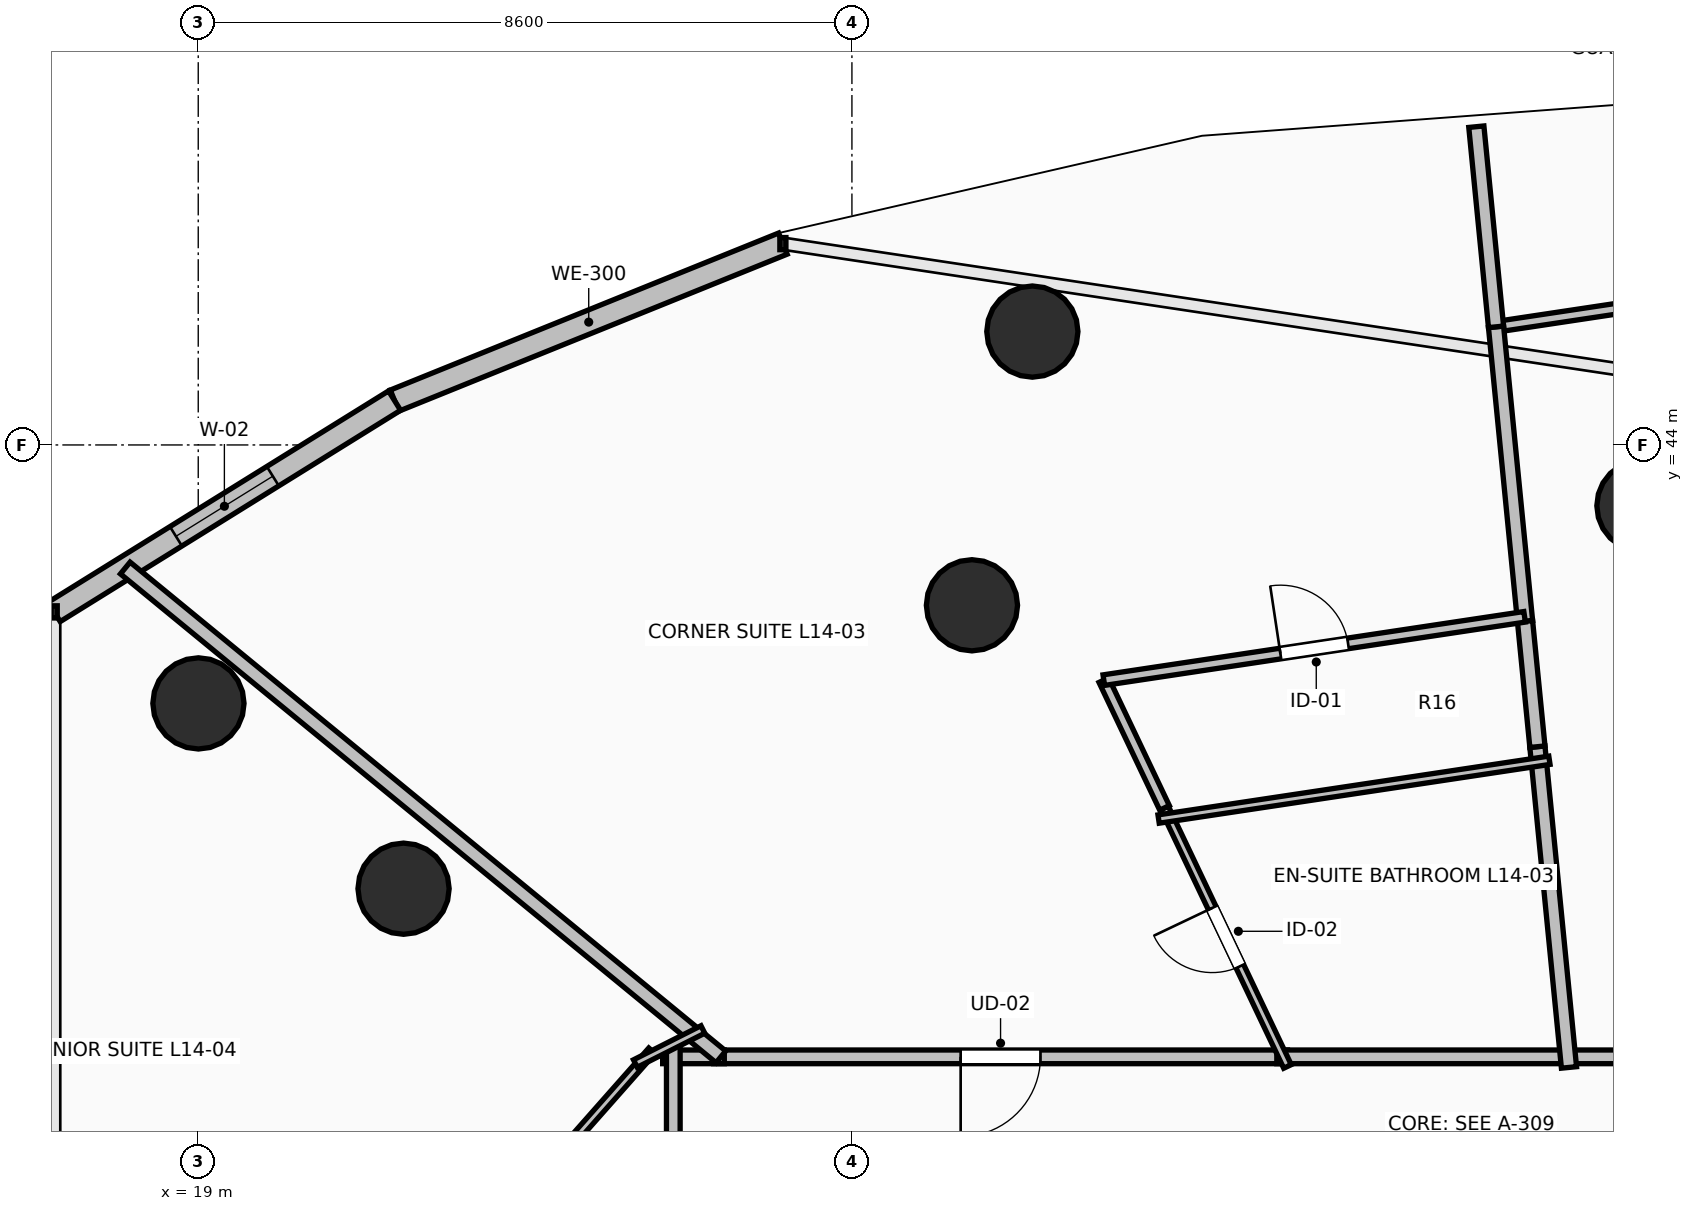
"""IFC4 building model, lengths in metres.
Left out: names, types, materials, properties, quantities, classifications, styles, units other than length and angle.
Written with IfcOpenShell. Run it as: python <this file> out.ifc"""

import sys

from ifc_helpers import new_model, si_unit, direction, frame, frame_2d, origin, origin_2d, place, context, subcontext, project, spatial, rectangle, circle, extrude, element, fill, save


model = new_model("IFC4")
c1 = context("Model", 3, precision=1e-05, world=origin(), true_north=direction((0.0, 1.0)))
c2 = subcontext(c1, "Body", "Model", "MODEL_VIEW")
j1 = project(units=[si_unit("LENGTHUNIT", "METRE"), si_unit("PLANEANGLEUNIT", "RADIAN")], contexts=[c1])
p1 = place(None, origin())
s1 = spatial("IfcSite", under=j1, at=p1, CompositionType="ELEMENT")
p2 = place(p1, origin())
s2 = spatial("IfcBuilding", under=s1, at=p2, CompositionType="ELEMENT")
p3 = place(p2, frame((0.0, 0.0, 55.5)))
s3 = spatial("IfcBuildingStorey", under=s2, at=p3, CompositionType="ELEMENT", Elevation=55.5)
for number, where, z_axis, x_axis in (
    (1, (38.0, 43.2, 0.0), (0.0, 0.0, 1.0), (0.0, 1.0, 0.0)),
    (2, (29.179, 41.891, 0.0), (0.0, 0.0, 1.0), (-0.383, 0.924, 0.0)),
    (3, (21.701, 38.162, 0.0), (0.0, 0.0, 1.0), (-0.707, 0.707, 0.0)),
    (4, (29.974, 45.492, 0.0), (0.0, 0.0, 1.0), (-0.383, 0.924, 0.0)),
    (5, (19.003, 40.6, 0.0), (0.0, 0.0, 1.0), (-0.707, 0.707, 0.0)),
):
    element("IfcColumn", number, at=place(p3, frame(where, z_axis=z_axis, x_axis=x_axis)), inside=s3, PredefinedType="COLUMN", context=c2, shape_type="SweptSolid", body=[
        extrude(circle(Radius=0.6, at=origin_2d()), origin(), (0.0, 0.0, 1.0), 3.5),
    ])
p4 = place(p3, frame((26.692, 46.649, 0.0), z_axis=(0.0, 0.0, 1.0), x_axis=(-0.927095325176, -0.374825636845, 0.0)))
e6 = element("IfcWall", 6, at=p4, inside=s3, PredefinedType="STANDARD", context=c2, shape_type="SweptSolid", body=[
    extrude(rectangle(XDim=5.51, YDim=0.3, at=frame_2d((2.755, 0.0))), origin(), (0.0, 0.0, 1.0), 3.24),
])
p5 = place(p3, frame((21.583, 44.583, 0.0), z_axis=(0.0, 0.0, 1.0), x_axis=(-0.849633724826, -0.527373239404, 0.0)))
e7 = element("IfcWall", 7, at=p5, inside=s3, PredefinedType="STANDARD", context=c2, shape_type="SweptSolid", body=[
    extrude(rectangle(XDim=5.271, YDim=0.3, at=frame_2d((2.635, 0.0))), origin(), (0.0, 0.0, 1.0), 3.24),
])
p6 = place(p5, frame((1.885, 0.0, 0.85)))
e8 = element("IfcOpeningElement", 8, at=p6, cuts=e7, PredefinedType="OPENING", context=c2, shape_type="SweptSolid", body=[
    extrude(rectangle(XDim=1.5, YDim=2.19, at=frame_2d((0.75, 1.095))), frame((0.0, 0.165, 0.0), z_axis=(0.0, -1.0, 0.0), x_axis=(1.0, 0.0, 0.0)), (0.0, 0.0, 1.0), 0.33),
])
p7 = place(p3, frame((41.602, 35.95, 0.0), z_axis=(0.0, 0.0, 1.0), x_axis=(-1.0, 0.0, 0.0)))
e9 = element("IfcWall", 9, at=p7, inside=s3, PredefinedType="PARTITIONING", context=c2, shape_type="SweptSolid", body=[
    extrude(rectangle(XDim=4.642, YDim=0.18, at=frame_2d((2.321, 0.0))), origin(), (0.0, 0.0, 1.0), 3.24),
])
p8 = place(p7, frame((1.796, 0.0, 0.0)))
e10 = element("IfcOpeningElement", 10, at=p8, cuts=e9, PredefinedType="OPENING", context=c2, shape_type="SweptSolid", body=[
    extrude(rectangle(XDim=1.05, YDim=2.2, at=frame_2d((0.525, 1.1))), frame((0.0, 0.105, 0.0), z_axis=(0.0, -1.0, 0.0), x_axis=(1.0, 0.0, 0.0)), (0.0, 0.0, 1.0), 0.21),
])
p9 = place(p3, frame((33.33, 35.95, 0.0), z_axis=(0.0, 0.0, 1.0), x_axis=(-1.0, 0.0, 0.0)))
e11 = element("IfcWall", 11, at=p9, inside=s3, PredefinedType="PARTITIONING", context=c2, shape_type="SweptSolid", body=[
    extrude(rectangle(XDim=7.549, YDim=0.18, at=frame_2d((3.774, 0.0))), origin(), (0.0, 0.0, 1.0), 2.432),
])
p10 = place(p9, frame((3.25, 0.0, 0.0)))
e12 = element("IfcOpeningElement", 12, at=p10, cuts=e11, PredefinedType="OPENING", context=c2, shape_type="SweptSolid", body=[
    extrude(rectangle(XDim=1.05, YDim=2.2, at=frame_2d((0.525, 1.1))), frame((0.0, 0.105, 0.0), z_axis=(0.0, -1.0, 0.0), x_axis=(1.0, 0.0, 0.0)), (0.0, 0.0, 1.0), 0.21),
])
p11 = place(p3, frame((37.1, 35.95, 0.0), z_axis=(0.0, 0.0, 1.0), x_axis=(-1.0, 0.0, 0.0)))
e13 = element("IfcWall", 13, at=p11, inside=s3, PredefinedType="PARTITIONING", context=c2, shape_type="SweptSolid", body=[
    extrude(rectangle(XDim=3.91, YDim=0.18, at=frame_2d((1.955, 0.0))), origin(), (0.0, 0.0, 1.0), 3.24),
])
p12 = place(p3, frame((25.921, 35.95, 0.0), z_axis=(0.0, 0.0, 1.0), x_axis=(-1.0, 0.0, 0.0)))
e14 = element("IfcWall", 14, at=p12, inside=s3, PredefinedType="PARTITIONING", context=c2, shape_type="SweptSolid", body=[
    extrude(rectangle(XDim=0.811, YDim=0.18, at=frame_2d((0.405, 0.0))), origin(), (0.0, 0.0, 1.0), 2.929),
])
p13 = place(p3, frame((25.25, 36.09, 0.0), z_axis=(0.0, 0.0, 1.0), x_axis=(0.0, -1.0, 0.0)))
e15 = element("IfcWall", 15, at=p13, inside=s3, PredefinedType="PARTITIONING", context=c2, shape_type="SweptSolid", body=[
    extrude(rectangle(XDim=5.632, YDim=0.18, at=frame_2d((2.816, 0.0))), origin(), (0.0, 0.0, 1.0), 2.432),
])
p14 = place(p3, frame((38.0, 45.844, 0.0), z_axis=(0.0, 0.0, 1.0), x_axis=(-0.988850683948, -0.148910459188, 0.0)))
e16 = element("IfcWall", 16, at=p14, inside=s3, PredefinedType="PARTITIONING", context=c2, shape_type="SweptSolid", body=[
    extrude(rectangle(XDim=1.948, YDim=0.14, at=frame_2d((0.974, 0.0))), origin(), (0.0, 0.0, 1.0), 2.624),
])
p15 = place(p3, frame((36.074, 45.554, 0.0), z_axis=(0.0, 0.0, 1.0), x_axis=(0.098125465648, -0.995174051607, 0.0)))
e17 = element("IfcWall", 17, at=p15, inside=s3, PredefinedType="PARTITIONING", context=c2, shape_type="SweptSolid", body=[
    extrude(rectangle(XDim=3.894, YDim=0.2, at=frame_2d((1.947, 0.0))), origin(), (0.0, 0.0, 1.0), 2.432),
])
p16 = place(p3, frame((36.618, 40.03, 0.0), z_axis=(0.0, 0.0, 1.0), x_axis=(0.09794716995, -0.995191615669, 0.0)))
e18 = element("IfcWall", 18, at=p16, inside=s3, PredefinedType="PARTITIONING", context=c2, shape_type="SweptSolid", body=[
    extrude(rectangle(XDim=4.24, YDim=0.2, at=frame_2d((2.12, 0.0))), origin(), (0.0, 0.0, 1.0), 2.929),
])
p17 = place(p3, frame((36.456, 41.679, 0.0), z_axis=(0.0, 0.0, 1.0), x_axis=(0.098146679276, -0.995171959687, 0.0)))
e19 = element("IfcWall", 19, at=p17, inside=s3, PredefinedType="PARTITIONING", context=c2, shape_type="SweptSolid", body=[
    extrude(rectangle(XDim=1.657, YDim=0.2, at=frame_2d((0.828, 0.0))), origin(), (0.0, 0.0, 1.0), 2.432),
])
p18 = place(p3, frame((35.815, 48.187, 0.0), z_axis=(0.0, 0.0, 1.0), x_axis=(0.097904750383, -0.995195789708, 0.0)))
e20 = element("IfcWall", 20, at=p18, inside=s3, PredefinedType="PARTITIONING", context=c2, shape_type="SweptSolid", body=[
    extrude(rectangle(XDim=2.646, YDim=0.2, at=frame_2d((1.323, 0.0))), origin(), (0.0, 0.0, 1.0), 2.624),
])
p19 = place(p3, frame((33.33, 35.823, 0.0), z_axis=(0.0, 0.0, 1.0), x_axis=(-0.429339722165, 0.903143068938, 0.0)))
e21 = element("IfcWall", 21, at=p19, inside=s3, PredefinedType="PARTITIONING", context=c2, shape_type="SweptSolid", body=[
    extrude(rectangle(XDim=3.767, YDim=0.11, at=frame_2d((1.883, 0.0))), origin(), (0.0, 0.0, 1.0), 2.432),
])
p20 = place(p19, frame((1.458, 0.0, 0.0)))
e22 = element("IfcOpeningElement", 22, at=p20, cuts=e21, PredefinedType="OPENING", context=c2, shape_type="SweptSolid", body=[
    extrude(rectangle(XDim=0.85, YDim=2.1, at=frame_2d((0.425, 1.05))), frame((0.0, 0.07, 0.0), z_axis=(0.0, -1.0, 0.0), x_axis=(1.0, 0.0, 0.0)), (0.0, 0.0, 1.0), 0.14),
])
p21 = place(p3, frame((31.713, 39.225, 0.0), z_axis=(0.0, 0.0, 1.0), x_axis=(-0.429281598359, 0.90317069777, 0.0)))
e23 = element("IfcWall", 23, at=p21, inside=s3, PredefinedType="PARTITIONING", context=c2, shape_type="SweptSolid", body=[
    extrude(rectangle(XDim=1.861, YDim=0.14, at=frame_2d((0.93, 0.0))), origin(), (0.0, 0.0, 1.0), 2.886),
])
p22 = place(p3, frame((30.914, 40.906, 0.0), z_axis=(0.0, 0.0, 1.0), x_axis=(0.988867472121, 0.148798933401, 0.0)))
e24 = element("IfcWall", 24, at=p22, inside=s3, PredefinedType="PARTITIONING", context=c2, shape_type="SweptSolid", body=[
    extrude(rectangle(XDim=5.598, YDim=0.14, at=frame_2d((2.799, 0.0))), origin(), (0.0, 0.0, 1.0), 2.432),
])
p23 = place(p22, frame((2.349, 0.0, 0.0)))
e25 = element("IfcOpeningElement", 25, at=p23, cuts=e24, PredefinedType="OPENING", context=c2, shape_type="SweptSolid", body=[
    extrude(rectangle(XDim=0.9, YDim=2.1, at=frame_2d((0.45, 1.05))), frame((0.0, 0.085, 0.0), z_axis=(0.0, -1.0, 0.0), x_axis=(1.0, 0.0, 0.0)), (0.0, 0.0, 1.0), 0.17),
])
p24 = place(p3, frame((18.04, 42.381, 0.0), z_axis=(0.0, 0.0, 1.0), x_axis=(0.772992813725, -0.634414777515, 0.0)))
e26 = element("IfcWall", 26, at=p24, inside=s3, PredefinedType="PARTITIONING", context=c2, shape_type="SweptSolid", body=[
    extrude(rectangle(XDim=10.137, YDim=0.2, at=frame_2d((5.069, 0.0))), origin(), (0.0, 0.0, 1.0), 2.624),
])
p25 = place(p3, frame((36.776, 39.852, 0.0), z_axis=(0.0, 0.0, 1.0), x_axis=(-0.988868403521, -0.148792743496, 0.0)))
e27 = element("IfcWall", 27, at=p25, inside=s3, PredefinedType="PARTITIONING", context=c2, shape_type="SweptSolid", body=[
    extrude(rectangle(XDim=5.2, YDim=0.11, at=frame_2d((2.6, 0.0))), origin(), (0.0, 0.0, 1.0), 2.432),
])
p26 = place(p3, frame((21.248, 31.819, 0.0), z_axis=(0.0, 0.0, 1.0), x_axis=(0.662135950736, 0.749383735307, 0.0)))
e28 = element("IfcWall", 28, at=p26, inside=s3, PredefinedType="PARTITIONING", context=c2, shape_type="SweptSolid", body=[
    extrude(rectangle(XDim=5.619, YDim=0.11, at=frame_2d((2.81, 0.0))), origin(), (0.0, 0.0, 1.0), 2.432),
])
p27 = place(p26, frame((2.385, 0.0, 0.0)))
e29 = element("IfcOpeningElement", 29, at=p27, cuts=e28, PredefinedType="OPENING", context=c2, shape_type="SweptSolid", body=[
    extrude(rectangle(XDim=0.85, YDim=2.1, at=frame_2d((0.425, 1.05))), frame((0.0, 0.07, 0.0), z_axis=(0.0, -1.0, 0.0), x_axis=(1.0, 0.0, 0.0)), (0.0, 0.0, 1.0), 0.14),
])
p28 = place(p3, frame((24.751, 35.862, 0.0), z_axis=(0.0, 0.0, 1.0), x_axis=(0.892702438486, 0.450646598037, 0.0)))
e30 = element("IfcWall", 30, at=p28, inside=s3, PredefinedType="PARTITIONING", context=c2, shape_type="SweptSolid", body=[
    extrude(rectangle(XDim=0.995, YDim=0.11, at=frame_2d((0.497, 0.0))), origin(), (0.0, 0.0, 1.0), 3.24),
])
p29 = place(p6, origin())
e31 = element("IfcWindow", 31, at=p29, inside=s3, PartitioningType="SINGLE_PANEL", PredefinedType="WINDOW", context=c2, shape_type="SweptSolid", body=[
    extrude(rectangle(XDim=1.5, YDim=2.19, at=frame_2d((0.75, 1.095))), frame((0.0, 0.03, 0.0), z_axis=(0.0, -1.0, 0.0), x_axis=(1.0, 0.0, 0.0)), (0.0, 0.0, 1.0), 0.06),
])
fill(e8, e31)
p30 = place(p10, origin())
e32 = element("IfcDoor", 32, at=p30, inside=s3, OperationType="SINGLE_SWING_RIGHT", PredefinedType="DOOR", context=c2, shape_type="SweptSolid", body=[
    extrude(rectangle(XDim=1.05, YDim=2.2, at=frame_2d((0.525, 1.1))), frame((0.0, 0.025, 0.0), z_axis=(0.0, -1.0, 0.0), x_axis=(1.0, 0.0, 0.0)), (0.0, 0.0, 1.0), 0.05),
])
fill(e12, e32)
p31 = place(p20, origin())
e33 = element("IfcDoor", 33, at=p31, inside=s3, OperationType="SINGLE_SWING_RIGHT", PredefinedType="DOOR", context=c2, shape_type="SweptSolid", body=[
    extrude(rectangle(XDim=0.85, YDim=2.1, at=frame_2d((0.425, 1.05))), frame((0.0, 0.025, 0.0), z_axis=(0.0, -1.0, 0.0), x_axis=(1.0, 0.0, 0.0)), (0.0, 0.0, 1.0), 0.05),
])
fill(e22, e33)
p32 = place(p23, origin())
e34 = element("IfcDoor", 34, at=p32, inside=s3, OperationType="SINGLE_SWING_LEFT", PredefinedType="DOOR", context=c2, shape_type="SweptSolid", body=[
    extrude(rectangle(XDim=0.9, YDim=2.1, at=frame_2d((0.45, 1.05))), frame((0.0, 0.025, 0.0), z_axis=(0.0, -1.0, 0.0), x_axis=(1.0, 0.0, 0.0)), (0.0, 0.0, 1.0), 0.05),
])
fill(e25, e34)
save(model, sys.argv[1])
